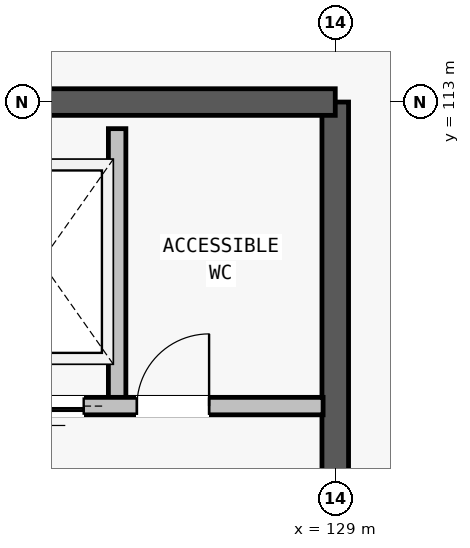
"""IFC4 building model, lengths in metres.
Left out: names, types, materials, properties, quantities, classifications, styles, units other than length and angle.
Written with IfcOpenShell. Run it as: python <this file> out.ifc"""

import sys

from ifc_helpers import new_model, si_unit, direction, frame, frame_2d, origin, place, context, subcontext, project, spatial, rectangle, extrude, element, fill, save


model = new_model("IFC4")
c1 = context("Model", 3, precision=1e-05, world=origin(), true_north=direction((0.0, 1.0)))
c2 = subcontext(c1, "Body", "Model", "MODEL_VIEW")
j1 = project(units=[si_unit("LENGTHUNIT", "METRE"), si_unit("PLANEANGLEUNIT", "RADIAN")], contexts=[c1])
p1 = place(None, origin())
s1 = spatial("IfcSite", under=j1, at=p1, CompositionType="ELEMENT")
p2 = place(p1, origin())
s2 = spatial("IfcBuilding", under=s1, at=p2, CompositionType="ELEMENT")
p3 = place(p2, frame((0.0, 0.0, 13.4)))
s3 = spatial("IfcBuildingStorey", under=s2, at=p3, CompositionType="ELEMENT", Elevation=13.4)
p4 = place(p3, frame((129.0, 104.0, 0.0), z_axis=(0.0, 0.0, 1.0), x_axis=(0.0, 1.0, 0.0)))
e1 = element("IfcWall", 1, at=p4, inside=s3, PredefinedType="SHEAR", context=c2, shape_type="SweptSolid", body=[
    extrude(rectangle(XDim=9.0, YDim=0.35, at=frame_2d((4.5, 0.0))), origin(), (0.0, 0.0, 1.0), 3.62),
])
p5 = place(p4, frame((1.4, 0.0, 0.0)))
e2 = element("IfcOpeningElement", 2, at=p5, cuts=e1, PredefinedType="OPENING", context=c2, shape_type="SweptSolid", body=[
    extrude(rectangle(XDim=1.9, YDim=2.3, at=frame_2d((0.95, 1.15))), frame((0.0, 0.185, 0.0), z_axis=(0.0, -1.0, 0.0), x_axis=(1.0, 0.0, 0.0)), (0.0, 0.0, 1.0), 0.37),
])
p6 = place(p3, frame((129.0, 113.0, 0.0), z_axis=(0.0, 0.0, 1.0), x_axis=(-1.0, 0.0, 0.0)))
e3 = element("IfcWall", 3, at=p6, inside=s3, PredefinedType="SHEAR", context=c2, shape_type="SweptSolid", body=[
    extrude(rectangle(XDim=9.0, YDim=0.35, at=frame_2d((4.5, 0.0))), origin(), (0.0, 0.0, 1.0), 3.62),
])
p7 = place(p3, frame((126.13, 109.0, 0.0), z_axis=(0.0, 0.0, 1.0), x_axis=(0.0, 1.0, 0.0)))
e4 = element("IfcWall", 4, at=p7, inside=s3, PredefinedType="PARTITIONING", context=c2, shape_type="SweptSolid", body=[
    extrude(rectangle(XDim=3.65, YDim=0.23, at=frame_2d((1.825, 0.0))), origin(), (0.0, 0.0, 1.0), 2.48),
])
p8 = place(p3, frame((124.21, 109.0, 0.0), z_axis=(0.0, 0.0, 1.0), x_axis=(1.0, 0.0, 0.0)))
e5 = element("IfcWall", 5, at=p8, inside=s3, PredefinedType="PARTITIONING", context=c2, shape_type="SweptSolid", body=[
    extrude(rectangle(XDim=4.63, YDim=0.23, at=frame_2d((2.315, 0.0))), origin(), (0.0, 0.0, 1.0), 2.48),
])
p9 = place(p8, frame((0.38, 0.0, 0.0)))
e6 = element("IfcOpeningElement", 6, at=p9, cuts=e5, PredefinedType="OPENING", context=c2, shape_type="SweptSolid", body=[
    extrude(rectangle(XDim=1.1, YDim=2.15, at=frame_2d((0.55, 1.075))), frame((0.0, 0.125, 0.0), z_axis=(0.0, -1.0, 0.0), x_axis=(1.0, 0.0, 0.0)), (0.0, 0.0, 1.0), 0.25),
])
p10 = place(p8, frame((2.18, 0.0, 0.0)))
e7 = element("IfcOpeningElement", 7, at=p10, cuts=e5, PredefinedType="OPENING", context=c2, shape_type="SweptSolid", body=[
    extrude(rectangle(XDim=0.95, YDim=2.1, at=frame_2d((0.475, 1.05))), frame((0.0, 0.125, 0.0), z_axis=(0.0, -1.0, 0.0), x_axis=(1.0, 0.0, 0.0)), (0.0, 0.0, 1.0), 0.25),
])
p11 = place(p9, origin())
e8 = element("IfcDoor", 8, at=p11, inside=s3, OperationType="SLIDING_TO_LEFT", PredefinedType="DOOR", context=c2, shape_type="SweptSolid", body=[
    extrude(rectangle(XDim=1.1, YDim=2.15, at=frame_2d((0.55, 1.075))), frame((0.0, 0.025, 0.0), z_axis=(0.0, -1.0, 0.0), x_axis=(1.0, 0.0, 0.0)), (0.0, 0.0, 1.0), 0.05),
])
fill(e6, e8)
p12 = place(p10, origin())
e9 = element("IfcDoor", 9, at=p12, inside=s3, OperationType="SINGLE_SWING_RIGHT", PredefinedType="DOOR", context=c2, shape_type="SweptSolid", body=[
    extrude(rectangle(XDim=0.95, YDim=2.1, at=frame_2d((0.475, 1.05))), frame((0.0, 0.025, 0.0), z_axis=(0.0, -1.0, 0.0), x_axis=(1.0, 0.0, 0.0)), (0.0, 0.0, 1.0), 0.05),
])
fill(e7, e9)
save(model, sys.argv[1])
